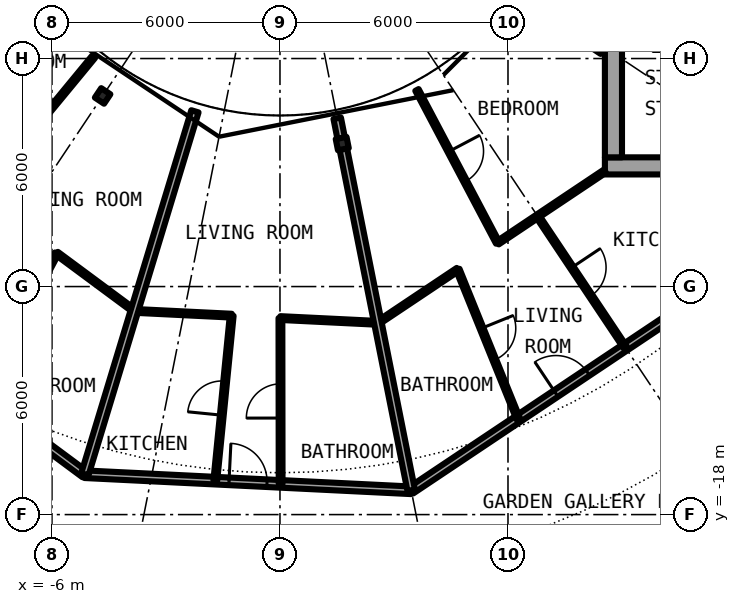
"""IFC4 building model, lengths in metres.
Left out: names, types, materials, properties, quantities, classifications, styles, units other than length and angle.
Written with IfcOpenShell. Run it as: python <this file> out.ifc"""

import sys

from ifc_helpers import new_model, si_unit, direction, frame, frame_2d, origin, origin_2d, place, context, subcontext, project, spatial, rectangle, i_section, extrude, element, fill, save


model = new_model("IFC4")
c1 = context("Model", 3, precision=1e-05, world=origin(), true_north=direction((0.0, 1.0)))
c2 = subcontext(c1, "Body", "Model", "MODEL_VIEW")
j1 = project(units=[si_unit("LENGTHUNIT", "METRE"), si_unit("PLANEANGLEUNIT", "RADIAN")], contexts=[c1])
p1 = place(None, origin())
s1 = spatial("IfcSite", under=j1, at=p1, CompositionType="ELEMENT")
p2 = place(p1, origin())
s2 = spatial("IfcBuilding", under=s1, at=p2, CompositionType="ELEMENT")
p3 = place(p2, frame((0.0, 0.0, 218.8)))
s3 = spatial("IfcBuildingStorey", under=s2, at=p3, CompositionType="ELEMENT", Elevation=218.8)
for number, where, z_axis, x_axis in (
    (1, (-4.667, -6.984, 0.0), (0.0, 0.0, 1.0), (-0.556, -0.831, 0.0)),
    (2, (1.639, -8.239, 0.0), (0.0, 0.0, 1.0), (0.195, -0.981, 0.0)),
):
    element("IfcColumn", number, at=place(p3, frame(where, z_axis=z_axis, x_axis=x_axis)), inside=s3, PredefinedType="COLUMN", context=c2, shape_type="SweptSolid", body=[
        extrude(i_section(OverallWidth=0.3, OverallDepth=0.29, WebThickness=0.009, FlangeThickness=0.014, FilletRadius=0.027, at=origin_2d()), origin(), (0.0, 0.0, 1.0), 3.05),
    ])
p4 = place(p3, frame((8.55, -8.825, 0.0), z_axis=(0.0, 0.0, 1.0), x_axis=(1.0, 0.0, 0.0)))
e3 = element("IfcWall", 3, at=p4, inside=s3, PredefinedType="SHEAR", context=c2, shape_type="SweptSolid", body=[
    extrude(rectangle(XDim=13.5, YDim=0.45, at=frame_2d((6.75, 0.0))), origin(), (0.0, 0.0, 1.0), 3.05),
])
p5 = place(p4, frame((11.325, 0.0, 0.0)))
e4 = element("IfcOpeningElement", 4, at=p5, cuts=e3, PredefinedType="OPENING", context=c2, shape_type="SweptSolid", body=[
    extrude(rectangle(XDim=1.2, YDim=2.3, at=frame_2d((0.6, 1.15))), frame((0.0, 0.235, 0.0), z_axis=(0.0, -1.0, 0.0), x_axis=(1.0, 0.0, 0.0)), (0.0, 0.0, 1.0), 0.47),
])
p6 = place(p3, frame((8.775, -8.6, 0.0), z_axis=(0.0, 0.0, 1.0), x_axis=(0.0, 1.0, 0.0)))
e5 = element("IfcWall", 5, at=p6, inside=s3, PredefinedType="SHEAR", context=c2, shape_type="SweptSolid", body=[
    extrude(rectangle(XDim=17.2, YDim=0.45, at=frame_2d((8.6, 0.0))), origin(), (0.0, 0.0, 1.0), 3.05),
])
p7 = place(p6, frame((7.4, 0.0, 0.1)))
e6 = element("IfcOpeningElement", 6, at=p7, cuts=e5, PredefinedType="OPENING", context=c2, shape_type="SweptSolid", body=[
    extrude(rectangle(XDim=2.4, YDim=2.2, at=frame_2d((1.2, 1.1))), frame((0.0, 0.235, 0.0), z_axis=(0.0, -1.0, 0.0), x_axis=(1.0, 0.0, 0.0)), (0.0, 0.0, 1.0), 0.47),
])
p8 = place(p3, frame((-5.138, -16.938, 0.0), z_axis=(0.0, 0.0, 1.0), x_axis=(0.998789433108, -0.049190124121, 0.0)))
e7 = element("IfcWall", 7, at=p8, inside=s3, PredefinedType="PARTITIONING", context=c2, shape_type="SweptSolid", body=[
    extrude(rectangle(XDim=8.601, YDim=0.2, at=frame_2d((4.301, 0.0))), origin(), (0.0, 0.0, 1.0), 2.65),
])
p9 = place(p8, frame((3.802, 0.0, 0.0)))
e8 = element("IfcOpeningElement", 8, at=p9, cuts=e7, PredefinedType="OPENING", context=c2, shape_type="SweptSolid", body=[
    extrude(rectangle(XDim=1.0, YDim=2.3, at=frame_2d((0.5, 1.15))), frame((0.0, 0.11, 0.0), z_axis=(0.0, -1.0, 0.0), x_axis=(1.0, 0.0, 0.0)), (0.0, 0.0, 1.0), 0.22),
])
p10 = place(p3, frame((-14.718, -9.833, 0.0), z_axis=(0.0, 0.0, 1.0), x_axis=(0.803240181354, -0.595655278712, 0.0)))
e9 = element("IfcWall", 9, at=p10, inside=s3, PredefinedType="PARTITIONING", context=c2, shape_type="SweptSolid", body=[
    extrude(rectangle(XDim=11.928, YDim=0.2, at=frame_2d((5.964, 0.0))), origin(), (0.0, 0.0, 1.0), 2.65),
])
p11 = place(p10, frame((6.316, 0.0, 0.0)))
e10 = element("IfcOpeningElement", 10, at=p11, cuts=e9, PredefinedType="OPENING", context=c2, shape_type="SweptSolid", body=[
    extrude(rectangle(XDim=1.0, YDim=2.3, at=frame_2d((0.5, 1.15))), frame((0.0, 0.11, 0.0), z_axis=(0.0, -1.0, 0.0), x_axis=(1.0, 0.0, 0.0)), (0.0, 0.0, 1.0), 0.22),
])
p12 = place(p3, frame((3.451, -17.361, 0.0), z_axis=(0.0, 0.0, 1.0), x_axis=(0.831492679744, 0.555535708603, 0.0)))
e11 = element("IfcWall", 11, at=p12, inside=s3, PredefinedType="PARTITIONING", context=c2, shape_type="SweptSolid", body=[
    extrude(rectangle(XDim=13.549, YDim=0.2, at=frame_2d((6.775, 0.0))), origin(), (0.0, 0.0, 1.0), 2.65),
])
p13 = place(p12, frame((4.583, 0.0, 0.0)))
e12 = element("IfcOpeningElement", 12, at=p13, cuts=e11, PredefinedType="OPENING", context=c2, shape_type="SweptSolid", body=[
    extrude(rectangle(XDim=1.0, YDim=2.3, at=frame_2d((0.5, 1.15))), frame((0.0, 0.11, 0.0), z_axis=(0.0, -1.0, 0.0), x_axis=(1.0, 0.0, 0.0)), (0.0, 0.0, 1.0), 0.22),
])
p14 = place(p3, frame((-3.834, -12.64, 0.0), z_axis=(0.0, 0.0, 1.0), x_axis=(0.998790464653, -0.049169174464, 0.0)))
e13 = element("IfcWall", 13, at=p14, inside=s3, PredefinedType="PARTITIONING", context=c2, shape_type="SweptSolid", body=[
    extrude(rectangle(XDim=2.567, YDim=0.1, at=frame_2d((1.284, 0.0))), origin(), (0.0, 0.0, 1.0), 2.65),
])
p15 = place(p3, frame((0.009, -12.829, 0.0), z_axis=(0.0, 0.0, 1.0), x_axis=(0.99879878705, -0.048999826404, 0.0)))
e14 = element("IfcWall", 14, at=p15, inside=s3, PredefinedType="PARTITIONING", context=c2, shape_type="SweptSolid", body=[
    extrude(rectangle(XDim=2.571, YDim=0.1, at=frame_2d((1.286, 0.0))), origin(), (0.0, 0.0, 1.0), 2.65),
])
p16 = place(p3, frame((-5.874, -11.127, 0.0), z_axis=(0.0, 0.0, 1.0), x_axis=(0.803533389313, -0.595259684725, 0.0)))
e15 = element("IfcWall", 15, at=p16, inside=s3, PredefinedType="PARTITIONING", context=c2, shape_type="SweptSolid", body=[
    extrude(rectangle(XDim=2.544, YDim=0.1, at=frame_2d((1.272, 0.0))), origin(), (0.0, 0.0, 1.0), 2.65),
])
p17 = place(p3, frame((2.578, -12.955, 0.0), z_axis=(0.0, 0.0, 1.0), x_axis=(0.831440395268, 0.555613956912, 0.0)))
e16 = element("IfcWall", 16, at=p17, inside=s3, PredefinedType="PARTITIONING", context=c2, shape_type="SweptSolid", body=[
    extrude(rectangle(XDim=2.527, YDim=0.1, at=frame_2d((1.264, 0.0))), origin(), (0.0, 0.0, 1.0), 2.65),
])
p18 = place(p3, frame((5.73, -10.849, 0.0), z_axis=(0.0, 0.0, 1.0), x_axis=(0.83129689803, 0.555828631257, 0.0)))
e17 = element("IfcWall", 17, at=p18, inside=s3, PredefinedType="PARTITIONING", context=c2, shape_type="SweptSolid", body=[
    extrude(rectangle(XDim=3.394, YDim=0.1, at=frame_2d((1.697, 0.0))), origin(), (0.0, 0.0, 1.0), 2.65),
])
p19 = place(p3, frame((6.513, -4.472, 0.0), z_axis=(0.0, 0.0, 1.0), x_axis=(0.831403409976, -0.555669299026, 0.0)))
e18 = element("IfcWall", 18, at=p19, inside=s3, PredefinedType="PARTITIONING", context=c2, shape_type="SweptSolid", body=[
    extrude(rectangle(XDim=2.383, YDim=0.2, at=frame_2d((1.191, 0.0))), origin(), (0.0, 0.0, 1.0), 2.65),
])
p20 = place(p3, frame((-10.612, -12.878, 0.0), z_axis=(0.0, 0.0, 1.0), x_axis=(0.636115614725, 0.771593756262, 0.0)))
e19 = element("IfcWall", 19, at=p20, inside=s3, PredefinedType="PARTITIONING", context=c2, shape_type="SweptSolid", body=[
    extrude(rectangle(XDim=8.967, YDim=0.1, at=frame_2d((4.483, 0.0))), origin(), (0.0, 0.0, 1.0), 2.65),
])
p21 = place(p20, frame((1.667, 0.0, 0.0)))
e20 = element("IfcOpeningElement", 20, at=p21, cuts=e19, PredefinedType="OPENING", context=c2, shape_type="SweptSolid", body=[
    extrude(rectangle(XDim=0.9, YDim=2.3, at=frame_2d((0.45, 1.15))), frame((0.0, 0.06, 0.0), z_axis=(0.0, -1.0, 0.0), x_axis=(1.0, 0.0, 0.0)), (0.0, 0.0, 1.0), 0.12),
])
p22 = place(p20, frame((6.151, 0.0, 0.0)))
e21 = element("IfcOpeningElement", 21, at=p22, cuts=e19, PredefinedType="OPENING", context=c2, shape_type="SweptSolid", body=[
    extrude(rectangle(XDim=0.9, YDim=2.3, at=frame_2d((0.45, 1.15))), frame((0.0, 0.06, 0.0), z_axis=(0.0, -1.0, 0.0), x_axis=(1.0, 0.0, 0.0)), (0.0, 0.0, 1.0), 0.12),
])
p23 = place(p3, frame((-7.874, -14.909, 0.0), z_axis=(0.0, 0.0, 1.0), x_axis=(0.467030118529, 0.884241408432, 0.0)))
e22 = element("IfcWall", 22, at=p23, inside=s3, PredefinedType="PARTITIONING", context=c2, shape_type="SweptSolid", body=[
    extrude(rectangle(XDim=4.278, YDim=0.1, at=frame_2d((2.139, 0.0))), origin(), (0.0, 0.0, 1.0), 2.65),
])
p24 = place(p23, frame((1.69, 0.0, 0.0)))
e23 = element("IfcOpeningElement", 23, at=p24, cuts=e22, PredefinedType="OPENING", context=c2, shape_type="SweptSolid", body=[
    extrude(rectangle(XDim=0.9, YDim=2.3, at=frame_2d((0.45, 1.15))), frame((0.0, 0.06, 0.0), z_axis=(0.0, -1.0, 0.0), x_axis=(1.0, 0.0, 0.0)), (0.0, 0.0, 1.0), 0.12),
])
p25 = place(p3, frame((-5.134, -16.939, 0.0), z_axis=(0.0, 0.0, 1.0), x_axis=(0.290194791136, 0.956967597778, 0.0)))
e24 = element("IfcWall", 24, at=p25, inside=s3, PredefinedType="PARTITIONING", context=c2, shape_type="SweptSolid", body=[
    extrude(rectangle(XDim=9.979, YDim=0.2, at=frame_2d((4.99, 0.0))), origin(), (0.0, 0.0, 1.0), 2.65),
])
p26 = place(p3, frame((-1.702, -17.107, 0.0), z_axis=(0.0, 0.0, 1.0), x_axis=(0.099004993851, 0.9950869365, 0.0)))
e25 = element("IfcWall", 25, at=p26, inside=s3, PredefinedType="PARTITIONING", context=c2, shape_type="SweptSolid", body=[
    extrude(rectangle(XDim=4.362, YDim=0.1, at=frame_2d((2.181, 0.0))), origin(), (0.0, 0.0, 1.0), 2.65),
])
p27 = place(p26, frame((1.731, 0.0, 0.0)))
e26 = element("IfcOpeningElement", 26, at=p27, cuts=e25, PredefinedType="OPENING", context=c2, shape_type="SweptSolid", body=[
    extrude(rectangle(XDim=0.9, YDim=2.3, at=frame_2d((0.45, 1.15))), frame((0.0, 0.06, 0.0), z_axis=(0.0, -1.0, 0.0), x_axis=(1.0, 0.0, 0.0)), (0.0, 0.0, 1.0), 0.12),
])
p28 = place(p3, frame((0.017, -17.191, 0.0), z_axis=(0.0, 0.0, 1.0), x_axis=(-0.001175679402, 0.999999308889, 0.0)))
e27 = element("IfcWall", 27, at=p28, inside=s3, PredefinedType="PARTITIONING", context=c2, shape_type="SweptSolid", body=[
    extrude(rectangle(XDim=4.361, YDim=0.1, at=frame_2d((2.18, 0.0))), origin(), (0.0, 0.0, 1.0), 2.65),
])
p29 = place(p28, frame((1.731, 0.0, 0.0)))
e28 = element("IfcOpeningElement", 28, at=p29, cuts=e27, PredefinedType="OPENING", context=c2, shape_type="SweptSolid", body=[
    extrude(rectangle(XDim=0.9, YDim=2.3, at=frame_2d((0.45, 1.15))), frame((0.0, 0.06, 0.0), z_axis=(0.0, -1.0, 0.0), x_axis=(1.0, 0.0, 0.0)), (0.0, 0.0, 1.0), 0.12),
])
p30 = place(p3, frame((1.506, -7.572, 0.0), z_axis=(0.0, 0.0, 1.0), x_axis=(0.194709580384, -0.980860937802, 0.0)))
e29 = element("IfcWall", 29, at=p30, inside=s3, PredefinedType="PARTITIONING", context=c2, shape_type="SweptSolid", body=[
    extrude(rectangle(XDim=0.534, YDim=0.2, at=frame_2d((0.267, 0.0))), origin(), (0.0, 0.0, 1.0), 2.65),
])
p31 = place(p3, frame((1.667, -8.381, 0.0), z_axis=(0.0, 0.0, 1.0), x_axis=(0.195074954737, -0.98078833702, 0.0)))
e30 = element("IfcWall", 30, at=p31, inside=s3, PredefinedType="PARTITIONING", context=c2, shape_type="SweptSolid", body=[
    extrude(rectangle(XDim=9.155, YDim=0.2, at=frame_2d((4.577, 0.0))), origin(), (0.0, 0.0, 1.0), 2.65),
])
p32 = place(p3, frame((3.605, -6.827, 0.0), z_axis=(0.0, 0.0, 1.0), x_axis=(0.466962677975, -0.884277025246, 0.0)))
e31 = element("IfcWall", 31, at=p32, inside=s3, PredefinedType="PARTITIONING", context=c2, shape_type="SweptSolid", body=[
    extrude(rectangle(XDim=4.549, YDim=0.1, at=frame_2d((2.274, 0.0))), origin(), (0.0, 0.0, 1.0), 2.65),
])
p33 = place(p32, frame((1.824, 0.0, 0.0)))
e32 = element("IfcOpeningElement", 32, at=p33, cuts=e31, PredefinedType="OPENING", context=c2, shape_type="SweptSolid", body=[
    extrude(rectangle(XDim=0.9, YDim=2.3, at=frame_2d((0.45, 1.15))), frame((0.0, 0.06, 0.0), z_axis=(0.0, -1.0, 0.0), x_axis=(1.0, 0.0, 0.0)), (0.0, 0.0, 1.0), 0.12),
])
p34 = place(p3, frame((4.678, -11.551, 0.0), z_axis=(0.0, 0.0, 1.0), x_axis=(0.375509828455, -0.926818411952, 0.0)))
e33 = element("IfcWall", 33, at=p34, inside=s3, PredefinedType="PARTITIONING", context=c2, shape_type="SweptSolid", body=[
    extrude(rectangle(XDim=4.237, YDim=0.1, at=frame_2d((2.119, 0.0))), origin(), (0.0, 0.0, 1.0), 2.65),
])
p35 = place(p34, frame((1.669, 0.0, 0.0)))
e34 = element("IfcOpeningElement", 34, at=p35, cuts=e33, PredefinedType="OPENING", context=c2, shape_type="SweptSolid", body=[
    extrude(rectangle(XDim=0.9, YDim=2.3, at=frame_2d((0.45, 1.15))), frame((0.0, 0.06, 0.0), z_axis=(0.0, -1.0, 0.0), x_axis=(1.0, 0.0, 0.0)), (0.0, 0.0, 1.0), 0.12),
])
p36 = place(p3, frame((6.779, -10.148, 0.0), z_axis=(0.0, 0.0, 1.0), x_axis=(0.555528237031, -0.831497671591, 0.0)))
e35 = element("IfcWall", 35, at=p36, inside=s3, PredefinedType="PARTITIONING", context=c2, shape_type="SweptSolid", body=[
    extrude(rectangle(XDim=4.149, YDim=0.1, at=frame_2d((2.075, 0.0))), origin(), (0.0, 0.0, 1.0), 2.65),
])
p37 = place(p36, frame((1.624, 0.0, 0.0)))
e36 = element("IfcOpeningElement", 36, at=p37, cuts=e35, PredefinedType="OPENING", context=c2, shape_type="SweptSolid", body=[
    extrude(rectangle(XDim=0.9, YDim=2.3, at=frame_2d((0.45, 1.15))), frame((0.0, 0.06, 0.0), z_axis=(0.0, -1.0, 0.0), x_axis=(1.0, 0.0, 0.0)), (0.0, 0.0, 1.0), 0.12),
])
p38 = place(p9, origin())
e37 = element("IfcDoor", 37, at=p38, inside=s3, OperationType="SINGLE_SWING_RIGHT", PredefinedType="DOOR", context=c2, shape_type="SweptSolid", body=[
    extrude(rectangle(XDim=1.0, YDim=2.3, at=frame_2d((0.5, 1.15))), frame((0.0, 0.025, 0.0), z_axis=(0.0, -1.0, 0.0), x_axis=(1.0, 0.0, 0.0)), (0.0, 0.0, 1.0), 0.05),
])
fill(e8, e37)
p39 = place(p29, origin())
e38 = element("IfcDoor", 38, at=p39, inside=s3, OperationType="SINGLE_SWING_RIGHT", PredefinedType="DOOR", context=c2, shape_type="SweptSolid", body=[
    extrude(rectangle(XDim=0.9, YDim=2.3, at=frame_2d((0.45, 1.15))), frame((0.0, 0.025, 0.0), z_axis=(0.0, -1.0, 0.0), x_axis=(1.0, 0.0, 0.0)), (0.0, 0.0, 1.0), 0.05),
])
fill(e28, e38)
p40 = place(p27, origin())
e39 = element("IfcDoor", 39, at=p40, inside=s3, OperationType="SINGLE_SWING_RIGHT", PredefinedType="DOOR", context=c2, shape_type="SweptSolid", body=[
    extrude(rectangle(XDim=0.9, YDim=2.3, at=frame_2d((0.45, 1.15))), frame((0.0, 0.025, 0.0), z_axis=(0.0, -1.0, 0.0), x_axis=(1.0, 0.0, 0.0)), (0.0, 0.0, 1.0), 0.05),
])
fill(e26, e39)
p41 = place(p13, origin())
e40 = element("IfcDoor", 40, at=p41, inside=s3, OperationType="SINGLE_SWING_LEFT", PredefinedType="DOOR", context=c2, shape_type="SweptSolid", body=[
    extrude(rectangle(XDim=1.0, YDim=2.3, at=frame_2d((0.5, 1.15))), frame((0.0, 0.025, 0.0), z_axis=(0.0, -1.0, 0.0), x_axis=(1.0, 0.0, 0.0)), (0.0, 0.0, 1.0), 0.05),
])
fill(e12, e40)
p42 = place(p35, origin())
e41 = element("IfcDoor", 41, at=p42, inside=s3, OperationType="SINGLE_SWING_RIGHT", PredefinedType="DOOR", context=c2, shape_type="SweptSolid", body=[
    extrude(rectangle(XDim=0.9, YDim=2.3, at=frame_2d((0.45, 1.15))), frame((0.0, 0.025, 0.0), z_axis=(0.0, -1.0, 0.0), x_axis=(1.0, 0.0, 0.0)), (0.0, 0.0, 1.0), 0.05),
])
fill(e34, e41)
p43 = place(p37, origin())
e42 = element("IfcDoor", 42, at=p43, inside=s3, OperationType="SINGLE_SWING_LEFT", PredefinedType="DOOR", context=c2, shape_type="SweptSolid", body=[
    extrude(rectangle(XDim=0.9, YDim=2.3, at=frame_2d((0.45, 1.15))), frame((0.0, 0.025, 0.0), z_axis=(0.0, -1.0, 0.0), x_axis=(1.0, 0.0, 0.0)), (0.0, 0.0, 1.0), 0.05),
])
fill(e36, e42)
p44 = place(p33, origin())
e43 = element("IfcDoor", 43, at=p44, inside=s3, OperationType="SINGLE_SWING_LEFT", PredefinedType="DOOR", context=c2, shape_type="SweptSolid", body=[
    extrude(rectangle(XDim=0.9, YDim=2.3, at=frame_2d((0.45, 1.15))), frame((0.0, 0.025, 0.0), z_axis=(0.0, -1.0, 0.0), x_axis=(1.0, 0.0, 0.0)), (0.0, 0.0, 1.0), 0.05),
])
fill(e32, e43)
save(model, sys.argv[1])
